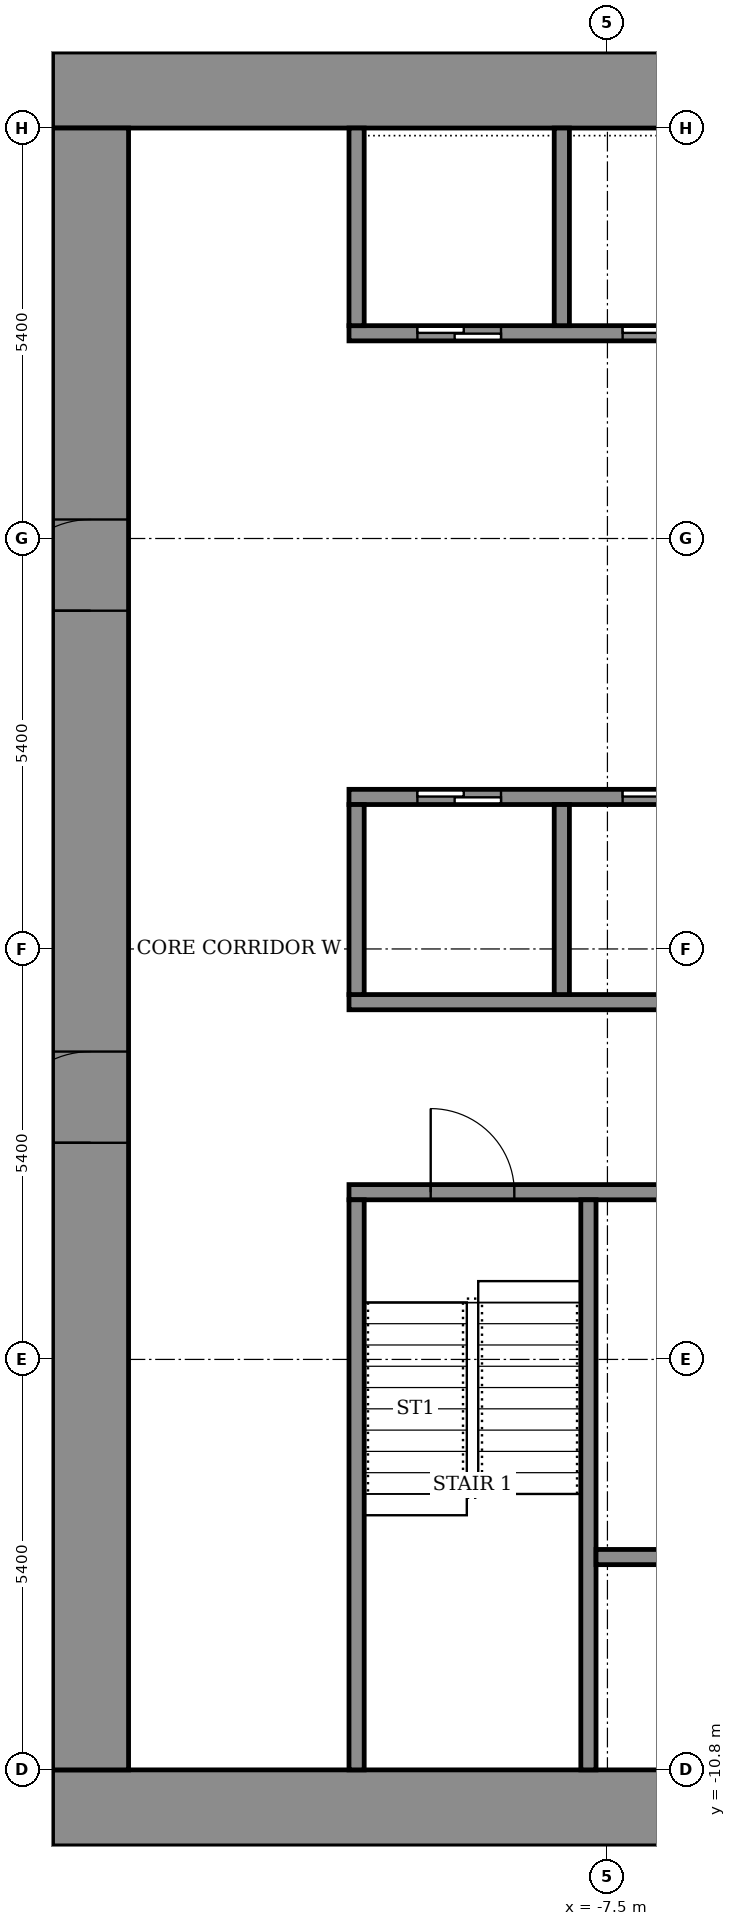
"""IFC4 building model, lengths in metres.
Left out: names, types, materials, properties, quantities, classifications, styles, units other than length and angle.
Written with IfcOpenShell. Run it as: python <this file> out.ifc"""

import sys

from ifc_helpers import new_model, si_unit, direction, frame, frame_2d, origin, place, context, subcontext, project, spatial, rectangle, extrude, element, fill, save


model = new_model("IFC4")
c1 = context("Model", 3, precision=1e-05, world=origin(), true_north=direction((0.0, 1.0)))
c2 = subcontext(c1, "Body", "Model", "MODEL_VIEW")
j1 = project(units=[si_unit("LENGTHUNIT", "METRE"), si_unit("PLANEANGLEUNIT", "RADIAN")], contexts=[c1])
p1 = place(None, origin())
s1 = spatial("IfcSite", under=j1, at=p1, CompositionType="ELEMENT")
p2 = place(p1, origin())
s2 = spatial("IfcBuilding", under=s1, at=p2, CompositionType="ELEMENT")
p3 = place(p2, frame((0.0, 0.0, 109.1)))
s3 = spatial("IfcBuildingStorey", under=s2, at=p3, CompositionType="ELEMENT", Elevation=109.1)
for number, where, z_axis, x_axis in (
    (1, (-14.8, -11.3, 0.0), (0.0, 0.0, 1.0), (1.0, 0.0, 0.0)),
    (2, (-14.8, 11.3, 0.0), (0.0, 0.0, 1.0), (1.0, 0.0, 0.0)),
):
    element("IfcWall", number, at=place(p3, frame(where, z_axis=z_axis, x_axis=x_axis)), inside=s3, PredefinedType="SHEAR", context=c2, shape_type="SweptSolid", body=[
        extrude(rectangle(XDim=29.6, YDim=1.0, at=frame_2d((14.8, 0.0))), origin(), (0.0, 0.0, 1.0), 3.6),
    ])
p4 = place(p3, frame((-14.3, -10.8, 0.0), z_axis=(0.0, 0.0, 1.0), x_axis=(0.0, 1.0, 0.0)))
e3 = element("IfcWall", 3, at=p4, inside=s3, PredefinedType="SHEAR", context=c2, shape_type="SweptSolid", body=[
    extrude(rectangle(XDim=21.6, YDim=1.0, at=frame_2d((10.8, 0.0))), origin(), (0.0, 0.0, 1.0), 3.6),
])
p5 = place(p4, frame((8.25, 0.0, 0.0)))
e4 = element("IfcOpeningElement", 4, at=p5, cuts=e3, PredefinedType="OPENING", context=c2, shape_type="SweptSolid", body=[
    extrude(rectangle(XDim=1.2, YDim=2.1, at=frame_2d((0.6, 1.05))), frame((0.0, 0.51, 0.0), z_axis=(0.0, -1.0, 0.0), x_axis=(1.0, 0.0, 0.0)), (0.0, 0.0, 1.0), 1.02),
])
p6 = place(p4, frame((15.25, 0.0, 0.0)))
e5 = element("IfcOpeningElement", 5, at=p6, cuts=e3, PredefinedType="OPENING", context=c2, shape_type="SweptSolid", body=[
    extrude(rectangle(XDim=1.2, YDim=2.1, at=frame_2d((0.6, 1.05))), frame((0.0, 0.51, 0.0), z_axis=(0.0, -1.0, 0.0), x_axis=(1.0, 0.0, 0.0)), (0.0, 0.0, 1.0), 1.02),
])
p7 = place(p3, frame((-10.9, -3.2, 0.0), z_axis=(0.0, 0.0, 1.0), x_axis=(1.0, 0.0, 0.0)))
e6 = element("IfcWall", 6, at=p7, inside=s3, PredefinedType="SHEAR", context=c2, shape_type="SweptSolid", body=[
    extrude(rectangle(XDim=21.8, YDim=0.2, at=frame_2d((10.9, 0.0))), origin(), (0.0, 0.0, 1.0), 3.05),
])
p8 = place(p7, frame((1.075, 0.0, 0.0)))
e7 = element("IfcOpeningElement", 7, at=p8, cuts=e6, PredefinedType="OPENING", context=c2, shape_type="SweptSolid", body=[
    extrude(rectangle(XDim=1.1, YDim=2.1, at=frame_2d((0.55, 1.05))), frame((0.0, 0.11, 0.0), z_axis=(0.0, -1.0, 0.0), x_axis=(1.0, 0.0, 0.0)), (0.0, 0.0, 1.0), 0.22),
])
p9 = place(p7, frame((10.325, 0.0, 0.0)))
e8 = element("IfcOpeningElement", 8, at=p9, cuts=e6, PredefinedType="OPENING", context=c2, shape_type="SweptSolid", body=[
    extrude(rectangle(XDim=1.1, YDim=2.1, at=frame_2d((0.55, 1.05))), frame((0.0, 0.11, 0.0), z_axis=(0.0, -1.0, 0.0), x_axis=(1.0, 0.0, 0.0)), (0.0, 0.0, 1.0), 0.22),
])
p10 = place(p7, frame((19.625, 0.0, 0.0)))
e9 = element("IfcOpeningElement", 9, at=p10, cuts=e6, PredefinedType="OPENING", context=c2, shape_type="SweptSolid", body=[
    extrude(rectangle(XDim=1.1, YDim=2.1, at=frame_2d((0.55, 1.05))), frame((0.0, 0.11, 0.0), z_axis=(0.0, -1.0, 0.0), x_axis=(1.0, 0.0, 0.0)), (0.0, 0.0, 1.0), 0.22),
])
p11 = place(p7, frame((5.7, 0.0, 0.0)))
e10 = element("IfcOpeningElement", 10, at=p11, cuts=e6, PredefinedType="OPENING", context=c2, shape_type="SweptSolid", body=[
    extrude(rectangle(XDim=1.1, YDim=2.1, at=frame_2d((0.55, 1.05))), frame((0.0, 0.11, 0.0), z_axis=(0.0, -1.0, 0.0), x_axis=(1.0, 0.0, 0.0)), (0.0, 0.0, 1.0), 0.22),
])
p12 = place(p7, frame((14.975, 0.0, 0.0)))
e11 = element("IfcOpeningElement", 11, at=p12, cuts=e6, PredefinedType="OPENING", context=c2, shape_type="SweptSolid", body=[
    extrude(rectangle(XDim=1.1, YDim=2.1, at=frame_2d((0.55, 1.05))), frame((0.0, 0.11, 0.0), z_axis=(0.0, -1.0, 0.0), x_axis=(1.0, 0.0, 0.0)), (0.0, 0.0, 1.0), 0.22),
])
p13 = place(p3, frame((-10.9, -0.7, 0.0), z_axis=(0.0, 0.0, 1.0), x_axis=(1.0, 0.0, 0.0)))
e12 = element("IfcWall", 12, at=p13, inside=s3, PredefinedType="SHEAR", context=c2, shape_type="SweptSolid", body=[
    extrude(rectangle(XDim=21.8, YDim=0.2, at=frame_2d((10.9, 0.0))), origin(), (0.0, 0.0, 1.0), 3.05),
])
p14 = place(p3, frame((-10.9, 2.0, 0.0), z_axis=(0.0, 0.0, 1.0), x_axis=(1.0, 0.0, 0.0)))
e13 = element("IfcWall", 13, at=p14, inside=s3, PredefinedType="SHEAR", context=c2, shape_type="SweptSolid", body=[
    extrude(rectangle(XDim=21.8, YDim=0.2, at=frame_2d((10.9, 0.0))), origin(), (0.0, 0.0, 1.0), 3.05),
])
p15 = place(p14, frame((0.9, 0.0, 0.0)))
e14 = element("IfcOpeningElement", 14, at=p15, cuts=e13, PredefinedType="OPENING", context=c2, shape_type="SweptSolid", body=[
    extrude(rectangle(XDim=1.1, YDim=2.1, at=frame_2d((0.55, 1.05))), frame((0.0, 0.11, 0.0), z_axis=(0.0, -1.0, 0.0), x_axis=(1.0, 0.0, 0.0)), (0.0, 0.0, 1.0), 0.22),
])
p16 = place(p14, frame((3.6, 0.0, 0.0)))
e15 = element("IfcOpeningElement", 15, at=p16, cuts=e13, PredefinedType="OPENING", context=c2, shape_type="SweptSolid", body=[
    extrude(rectangle(XDim=1.1, YDim=2.1, at=frame_2d((0.55, 1.05))), frame((0.0, 0.11, 0.0), z_axis=(0.0, -1.0, 0.0), x_axis=(1.0, 0.0, 0.0)), (0.0, 0.0, 1.0), 0.22),
])
p17 = place(p14, frame((6.3, 0.0, 0.0)))
e16 = element("IfcOpeningElement", 16, at=p17, cuts=e13, PredefinedType="OPENING", context=c2, shape_type="SweptSolid", body=[
    extrude(rectangle(XDim=1.1, YDim=2.1, at=frame_2d((0.55, 1.05))), frame((0.0, 0.11, 0.0), z_axis=(0.0, -1.0, 0.0), x_axis=(1.0, 0.0, 0.0)), (0.0, 0.0, 1.0), 0.22),
])
p18 = place(p14, frame((9.0, 0.0, 0.0)))
e17 = element("IfcOpeningElement", 17, at=p18, cuts=e13, PredefinedType="OPENING", context=c2, shape_type="SweptSolid", body=[
    extrude(rectangle(XDim=1.1, YDim=2.1, at=frame_2d((0.55, 1.05))), frame((0.0, 0.11, 0.0), z_axis=(0.0, -1.0, 0.0), x_axis=(1.0, 0.0, 0.0)), (0.0, 0.0, 1.0), 0.22),
])
p19 = place(p14, frame((11.7, 0.0, 0.0)))
e18 = element("IfcOpeningElement", 18, at=p19, cuts=e13, PredefinedType="OPENING", context=c2, shape_type="SweptSolid", body=[
    extrude(rectangle(XDim=1.1, YDim=2.1, at=frame_2d((0.55, 1.05))), frame((0.0, 0.11, 0.0), z_axis=(0.0, -1.0, 0.0), x_axis=(1.0, 0.0, 0.0)), (0.0, 0.0, 1.0), 0.22),
])
p20 = place(p14, frame((17.2, 0.0, 0.0)))
e19 = element("IfcOpeningElement", 19, at=p20, cuts=e13, PredefinedType="OPENING", context=c2, shape_type="SweptSolid", body=[
    extrude(rectangle(XDim=0.9, YDim=2.1, at=frame_2d((0.45, 1.05))), frame((0.0, 0.11, 0.0), z_axis=(0.0, -1.0, 0.0), x_axis=(1.0, 0.0, 0.0)), (0.0, 0.0, 1.0), 0.22),
])
p21 = place(p3, frame((-10.9, 8.1, 0.0), z_axis=(0.0, 0.0, 1.0), x_axis=(1.0, 0.0, 0.0)))
e20 = element("IfcWall", 20, at=p21, inside=s3, PredefinedType="SHEAR", context=c2, shape_type="SweptSolid", body=[
    extrude(rectangle(XDim=21.8, YDim=0.2, at=frame_2d((10.9, 0.0))), origin(), (0.0, 0.0, 1.0), 3.05),
])
p22 = place(p21, frame((0.9, 0.0, 0.0)))
e21 = element("IfcOpeningElement", 21, at=p22, cuts=e20, PredefinedType="OPENING", context=c2, shape_type="SweptSolid", body=[
    extrude(rectangle(XDim=1.1, YDim=2.1, at=frame_2d((0.55, 1.05))), frame((0.0, 0.11, 0.0), z_axis=(0.0, -1.0, 0.0), x_axis=(1.0, 0.0, 0.0)), (0.0, 0.0, 1.0), 0.22),
])
p23 = place(p21, frame((3.6, 0.0, 0.0)))
e22 = element("IfcOpeningElement", 22, at=p23, cuts=e20, PredefinedType="OPENING", context=c2, shape_type="SweptSolid", body=[
    extrude(rectangle(XDim=1.1, YDim=2.1, at=frame_2d((0.55, 1.05))), frame((0.0, 0.11, 0.0), z_axis=(0.0, -1.0, 0.0), x_axis=(1.0, 0.0, 0.0)), (0.0, 0.0, 1.0), 0.22),
])
p24 = place(p21, frame((6.3, 0.0, 0.0)))
e23 = element("IfcOpeningElement", 23, at=p24, cuts=e20, PredefinedType="OPENING", context=c2, shape_type="SweptSolid", body=[
    extrude(rectangle(XDim=1.1, YDim=2.1, at=frame_2d((0.55, 1.05))), frame((0.0, 0.11, 0.0), z_axis=(0.0, -1.0, 0.0), x_axis=(1.0, 0.0, 0.0)), (0.0, 0.0, 1.0), 0.22),
])
p25 = place(p21, frame((9.0, 0.0, 0.0)))
e24 = element("IfcOpeningElement", 24, at=p25, cuts=e20, PredefinedType="OPENING", context=c2, shape_type="SweptSolid", body=[
    extrude(rectangle(XDim=1.1, YDim=2.1, at=frame_2d((0.55, 1.05))), frame((0.0, 0.11, 0.0), z_axis=(0.0, -1.0, 0.0), x_axis=(1.0, 0.0, 0.0)), (0.0, 0.0, 1.0), 0.22),
])
p26 = place(p21, frame((11.7, 0.0, 0.0)))
e25 = element("IfcOpeningElement", 25, at=p26, cuts=e20, PredefinedType="OPENING", context=c2, shape_type="SweptSolid", body=[
    extrude(rectangle(XDim=1.1, YDim=2.1, at=frame_2d((0.55, 1.05))), frame((0.0, 0.11, 0.0), z_axis=(0.0, -1.0, 0.0), x_axis=(1.0, 0.0, 0.0)), (0.0, 0.0, 1.0), 0.22),
])
p27 = place(p21, frame((14.5, 0.0, 0.0)))
e26 = element("IfcOpeningElement", 26, at=p27, cuts=e20, PredefinedType="OPENING", context=c2, shape_type="SweptSolid", body=[
    extrude(rectangle(XDim=0.9, YDim=2.1, at=frame_2d((0.45, 1.05))), frame((0.0, 0.11, 0.0), z_axis=(0.0, -1.0, 0.0), x_axis=(1.0, 0.0, 0.0)), (0.0, 0.0, 1.0), 0.22),
])
p28 = place(p21, frame((18.55, 0.0, 0.0)))
e27 = element("IfcOpeningElement", 27, at=p28, cuts=e20, PredefinedType="OPENING", context=c2, shape_type="SweptSolid", body=[
    extrude(rectangle(XDim=0.9, YDim=2.1, at=frame_2d((0.45, 1.05))), frame((0.0, 0.11, 0.0), z_axis=(0.0, -1.0, 0.0), x_axis=(1.0, 0.0, 0.0)), (0.0, 0.0, 1.0), 0.22),
])
for number, where, z_axis, x_axis in (
    (28, (-10.8, -10.8, 0.0), (0.0, 0.0, 1.0), (0.0, 1.0, 0.0)),
    (29, (-7.75, -10.8, 0.0), (0.0, 0.0, 1.0), (0.0, 1.0, 0.0)),
):
    element("IfcWall", number, at=place(p3, frame(where, z_axis=z_axis, x_axis=x_axis)), inside=s3, PredefinedType="SHEAR", context=c2, shape_type="SweptSolid", body=[
        extrude(rectangle(XDim=7.5, YDim=0.2, at=frame_2d((3.75, 0.0))), origin(), (0.0, 0.0, 1.0), 3.05),
    ])
p29 = place(p3, frame((-7.65, -8.0, 0.0), z_axis=(0.0, 0.0, 1.0), x_axis=(1.0, 0.0, 0.0)))
e30 = element("IfcWall", 30, at=p29, inside=s3, PredefinedType="SHEAR", context=c2, shape_type="SweptSolid", body=[
    extrude(rectangle(XDim=6.0, YDim=0.2, at=frame_2d((3.0, 0.0))), origin(), (0.0, 0.0, 1.0), 3.05),
])
p30 = place(p29, frame((0.9, 0.0, 0.0)))
e31 = element("IfcOpeningElement", 31, at=p30, cuts=e30, PredefinedType="OPENING", context=c2, shape_type="SweptSolid", body=[
    extrude(rectangle(XDim=1.1, YDim=2.1, at=frame_2d((0.55, 1.05))), frame((0.0, 0.11, 0.0), z_axis=(0.0, -1.0, 0.0), x_axis=(1.0, 0.0, 0.0)), (0.0, 0.0, 1.0), 0.22),
])
p31 = place(p29, frame((4.0, 0.0, 0.0)))
e32 = element("IfcOpeningElement", 32, at=p31, cuts=e30, PredefinedType="OPENING", context=c2, shape_type="SweptSolid", body=[
    extrude(rectangle(XDim=1.1, YDim=2.1, at=frame_2d((0.55, 1.05))), frame((0.0, 0.11, 0.0), z_axis=(0.0, -1.0, 0.0), x_axis=(1.0, 0.0, 0.0)), (0.0, 0.0, 1.0), 0.22),
])
for number, where, z_axis, x_axis in (
    (33, (-10.8, -0.6, 0.0), (0.0, 0.0, 1.0), (0.0, 1.0, 0.0)),
    (34, (-8.1, -0.6, 0.0), (0.0, 0.0, 1.0), (0.0, 1.0, 0.0)),
):
    element("IfcWall", number, at=place(p3, frame(where, z_axis=z_axis, x_axis=x_axis)), inside=s3, PredefinedType="SHEAR", context=c2, shape_type="SweptSolid", body=[
        extrude(rectangle(XDim=2.5, YDim=0.2, at=frame_2d((1.25, 0.0))), origin(), (0.0, 0.0, 1.0), 3.05),
    ])
for number, where, z_axis, x_axis in (
    (35, (-10.8, 8.2, 0.0), (0.0, 0.0, 1.0), (0.0, 1.0, 0.0)),
    (36, (-8.1, 8.2, 0.0), (0.0, 0.0, 1.0), (0.0, 1.0, 0.0)),
):
    element("IfcWall", number, at=place(p3, frame(where, z_axis=z_axis, x_axis=x_axis)), inside=s3, PredefinedType="SHEAR", context=c2, shape_type="SweptSolid", body=[
        extrude(rectangle(XDim=2.6, YDim=0.2, at=frame_2d((1.3, 0.0))), origin(), (0.0, 0.0, 1.0), 3.05),
    ])
p32 = place(p5, origin())
e37 = element("IfcDoor", 37, at=p32, inside=s3, OperationType="DOUBLE_DOOR_SINGLE_SWING", PredefinedType="DOOR", context=c2, shape_type="SweptSolid", body=[
    extrude(rectangle(XDim=1.2, YDim=2.1, at=frame_2d((0.6, 1.05))), frame((0.0, 0.025, 0.0), z_axis=(0.0, -1.0, 0.0), x_axis=(1.0, 0.0, 0.0)), (0.0, 0.0, 1.0), 0.05),
])
fill(e4, e37)
p33 = place(p6, origin())
e38 = element("IfcDoor", 38, at=p33, inside=s3, OperationType="DOUBLE_DOOR_SINGLE_SWING", PredefinedType="DOOR", context=c2, shape_type="SweptSolid", body=[
    extrude(rectangle(XDim=1.2, YDim=2.1, at=frame_2d((0.6, 1.05))), frame((0.0, 0.025, 0.0), z_axis=(0.0, -1.0, 0.0), x_axis=(1.0, 0.0, 0.0)), (0.0, 0.0, 1.0), 0.05),
])
fill(e5, e38)
p34 = place(p15, origin())
e39 = element("IfcDoor", 39, at=p34, inside=s3, OperationType="SLIDING_TO_LEFT", PredefinedType="DOOR", context=c2, shape_type="SweptSolid", body=[
    extrude(rectangle(XDim=1.1, YDim=2.1, at=frame_2d((0.55, 1.05))), frame((0.0, 0.025, 0.0), z_axis=(0.0, -1.0, 0.0), x_axis=(1.0, 0.0, 0.0)), (0.0, 0.0, 1.0), 0.05),
])
fill(e14, e39)
p35 = place(p16, origin())
e40 = element("IfcDoor", 40, at=p35, inside=s3, OperationType="SLIDING_TO_LEFT", PredefinedType="DOOR", context=c2, shape_type="SweptSolid", body=[
    extrude(rectangle(XDim=1.1, YDim=2.1, at=frame_2d((0.55, 1.05))), frame((0.0, 0.025, 0.0), z_axis=(0.0, -1.0, 0.0), x_axis=(1.0, 0.0, 0.0)), (0.0, 0.0, 1.0), 0.05),
])
fill(e15, e40)
p36 = place(p22, origin())
e41 = element("IfcDoor", 41, at=p36, inside=s3, OperationType="SLIDING_TO_LEFT", PredefinedType="DOOR", context=c2, shape_type="SweptSolid", body=[
    extrude(rectangle(XDim=1.1, YDim=2.1, at=frame_2d((0.55, 1.05))), frame((0.0, 0.025, 0.0), z_axis=(0.0, -1.0, 0.0), x_axis=(1.0, 0.0, 0.0)), (0.0, 0.0, 1.0), 0.05),
])
fill(e21, e41)
p37 = place(p23, origin())
e42 = element("IfcDoor", 42, at=p37, inside=s3, OperationType="SLIDING_TO_LEFT", PredefinedType="DOOR", context=c2, shape_type="SweptSolid", body=[
    extrude(rectangle(XDim=1.1, YDim=2.1, at=frame_2d((0.55, 1.05))), frame((0.0, 0.025, 0.0), z_axis=(0.0, -1.0, 0.0), x_axis=(1.0, 0.0, 0.0)), (0.0, 0.0, 1.0), 0.05),
])
fill(e22, e42)
p38 = place(p8, origin())
e43 = element("IfcDoor", 43, at=p38, inside=s3, OperationType="SINGLE_SWING_RIGHT", PredefinedType="DOOR", context=c2, shape_type="SweptSolid", body=[
    extrude(rectangle(XDim=1.1, YDim=2.1, at=frame_2d((0.55, 1.05))), frame((0.0, 0.025, 0.0), z_axis=(0.0, -1.0, 0.0), x_axis=(1.0, 0.0, 0.0)), (0.0, 0.0, 1.0), 0.05),
])
fill(e7, e43)
save(model, sys.argv[1])
